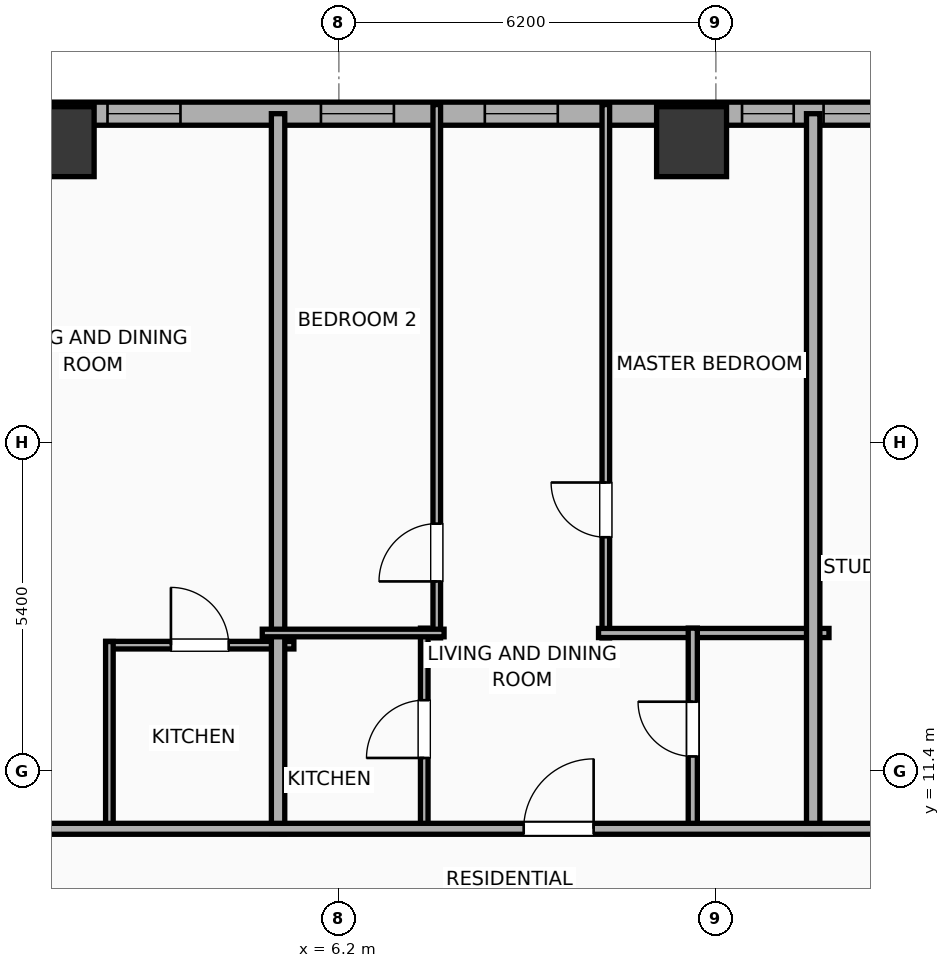
"""IFC4 building model, lengths in metres.
Left out: names, types, materials, properties, quantities, classifications, styles, units other than length and angle.
Written with IfcOpenShell. Run it as: python <this file> out.ifc"""

import sys

from ifc_helpers import new_model, si_unit, direction, frame, frame_2d, origin, origin_2d, place, context, subcontext, project, spatial, rectangle, hollow_rectangle, extrude, element, fill, save


model = new_model("IFC4")
c1 = context("Model", 3, precision=1e-05, world=origin(), true_north=direction((0.0, 1.0)))
c2 = subcontext(c1, "Body", "Model", "MODEL_VIEW")
j1 = project(units=[si_unit("LENGTHUNIT", "METRE"), si_unit("PLANEANGLEUNIT", "RADIAN")], contexts=[c1])
p1 = place(None, origin())
s1 = spatial("IfcSite", under=j1, at=p1, CompositionType="ELEMENT")
p2 = place(p1, origin())
s2 = spatial("IfcBuilding", under=s1, at=p2, CompositionType="ELEMENT")
p3 = place(p2, frame((0.0, 0.0, 72.8)))
s3 = spatial("IfcBuildingStorey", under=s2, at=p3, CompositionType="ELEMENT", Elevation=72.8)
for number, where, z_axis, x_axis in (
    (1, (12.0, 21.75, 0.0), (0.0, 0.0, 1.0), (1.0, 0.0, 0.0)),
    (2, (1.6, 21.75, 0.0), (0.0, 0.0, 1.0), (1.0, 0.0, 0.0)),
):
    element("IfcColumn", number, at=place(p3, frame(where, z_axis=z_axis, x_axis=x_axis)), inside=s3, PredefinedType="COLUMN", context=c2, shape_type="SweptSolid", body=[
        extrude(hollow_rectangle(XDim=1.15, YDim=1.15, WallThickness=0.04, at=origin_2d()), origin(), (0.0, 0.0, 1.0), 3.9),
    ])
p4 = place(p3, frame((-29.581, 22.21, 0.0), z_axis=(0.0, 0.0, 1.0), x_axis=(1.0, 0.0, 0.0)))
e3 = element("IfcWall", 3, at=p4, inside=s3, PredefinedType="ELEMENTEDWALL", context=c2, shape_type="SweptSolid", body=[
    extrude(rectangle(XDim=51.963, YDim=0.38, at=frame_2d((25.981, 0.0))), origin(), (0.0, 0.0, 1.0), 3.65),
])
p5 = place(p4, frame((5.81, 0.0, 0.75)))
e4 = element("IfcOpeningElement", 4, at=p5, cuts=e3, PredefinedType="OPENING", context=c2, shape_type="SweptSolid", body=[
    extrude(rectangle(XDim=2.4, YDim=2.1, at=frame_2d((1.2, 1.05))), frame((0.0, 0.2, 0.0), z_axis=(0.0, -1.0, 0.0), x_axis=(1.0, 0.0, 0.0)), (0.0, 0.0, 1.0), 0.4),
])
p6 = place(p4, frame((23.131, 0.0, 0.75)))
e5 = element("IfcOpeningElement", 5, at=p6, cuts=e3, PredefinedType="OPENING", context=c2, shape_type="SweptSolid", body=[
    extrude(rectangle(XDim=2.4, YDim=2.1, at=frame_2d((1.2, 1.05))), frame((0.0, 0.2, 0.0), z_axis=(0.0, -1.0, 0.0), x_axis=(1.0, 0.0, 0.0)), (0.0, 0.0, 1.0), 0.4),
])
p7 = place(p4, frame((43.752, 0.0, 0.75)))
e6 = element("IfcOpeningElement", 6, at=p7, cuts=e3, PredefinedType="OPENING", context=c2, shape_type="SweptSolid", body=[
    extrude(rectangle(XDim=2.4, YDim=2.1, at=frame_2d((1.2, 1.05))), frame((0.0, 0.2, 0.0), z_axis=(0.0, -1.0, 0.0), x_axis=(1.0, 0.0, 0.0)), (0.0, 0.0, 1.0), 0.4),
])
p8 = place(p4, frame((2.819, 0.0, 0.75)))
e7 = element("IfcOpeningElement", 7, at=p8, cuts=e3, PredefinedType="OPENING", context=c2, shape_type="SweptSolid", body=[
    extrude(rectangle(XDim=1.2, YDim=2.05, at=frame_2d((0.6, 1.025))), frame((0.0, 0.2, 0.0), z_axis=(0.0, -1.0, 0.0), x_axis=(1.0, 0.0, 0.0)), (0.0, 0.0, 1.0), 0.4),
])
p9 = place(p4, frame((11.781, 0.0, 0.75)))
e8 = element("IfcOpeningElement", 8, at=p9, cuts=e3, PredefinedType="OPENING", context=c2, shape_type="SweptSolid", body=[
    extrude(rectangle(XDim=1.2, YDim=2.05, at=frame_2d((0.6, 1.025))), frame((0.0, 0.2, 0.0), z_axis=(0.0, -1.0, 0.0), x_axis=(1.0, 0.0, 0.0)), (0.0, 0.0, 1.0), 0.4),
])
p10 = place(p4, frame((8.781, 0.0, 0.75)))
e9 = element("IfcOpeningElement", 9, at=p10, cuts=e3, PredefinedType="OPENING", context=c2, shape_type="SweptSolid", body=[
    extrude(rectangle(XDim=0.85, YDim=2.05, at=frame_2d((0.425, 1.025))), frame((0.0, 0.2, 0.0), z_axis=(0.0, -1.0, 0.0), x_axis=(1.0, 0.0, 0.0)), (0.0, 0.0, 1.0), 0.4),
])
p11 = place(p4, frame((14.876, 0.0, 0.75)))
e10 = element("IfcOpeningElement", 10, at=p11, cuts=e3, PredefinedType="OPENING", context=c2, shape_type="SweptSolid", body=[
    extrude(rectangle(XDim=1.2, YDim=2.05, at=frame_2d((0.6, 1.025))), frame((0.0, 0.2, 0.0), z_axis=(0.0, -1.0, 0.0), x_axis=(1.0, 0.0, 0.0)), (0.0, 0.0, 1.0), 0.4),
])
p12 = place(p4, frame((21.521, 0.0, 0.75)))
e11 = element("IfcOpeningElement", 11, at=p12, cuts=e3, PredefinedType="OPENING", context=c2, shape_type="SweptSolid", body=[
    extrude(rectangle(XDim=0.52, YDim=2.05, at=frame_2d((0.26, 1.025))), frame((0.0, 0.2, 0.0), z_axis=(0.0, -1.0, 0.0), x_axis=(1.0, 0.0, 0.0)), (0.0, 0.0, 1.0), 0.4),
])
p13 = place(p4, frame((17.886, 0.0, 0.75)))
e12 = element("IfcOpeningElement", 12, at=p13, cuts=e3, PredefinedType="OPENING", context=c2, shape_type="SweptSolid", body=[
    extrude(rectangle(XDim=1.2, YDim=2.05, at=frame_2d((0.6, 1.025))), frame((0.0, 0.2, 0.0), z_axis=(0.0, -1.0, 0.0), x_axis=(1.0, 0.0, 0.0)), (0.0, 0.0, 1.0), 0.4),
])
p14 = place(p4, frame((26.736, 0.0, 0.75)))
e13 = element("IfcOpeningElement", 13, at=p14, cuts=e3, PredefinedType="OPENING", context=c2, shape_type="SweptSolid", body=[
    extrude(rectangle(XDim=1.2, YDim=2.05, at=frame_2d((0.6, 1.025))), frame((0.0, 0.2, 0.0), z_axis=(0.0, -1.0, 0.0), x_axis=(1.0, 0.0, 0.0)), (0.0, 0.0, 1.0), 0.4),
])
p15 = place(p4, frame((31.976, 0.0, 0.75)))
e14 = element("IfcOpeningElement", 14, at=p15, cuts=e3, PredefinedType="OPENING", context=c2, shape_type="SweptSolid", body=[
    extrude(rectangle(XDim=1.2, YDim=2.05, at=frame_2d((0.6, 1.025))), frame((0.0, 0.2, 0.0), z_axis=(0.0, -1.0, 0.0), x_axis=(1.0, 0.0, 0.0)), (0.0, 0.0, 1.0), 0.4),
])
p16 = place(p4, frame((38.181, 0.0, 0.75)))
e15 = element("IfcOpeningElement", 15, at=p16, cuts=e3, PredefinedType="OPENING", context=c2, shape_type="SweptSolid", body=[
    extrude(rectangle(XDim=1.2, YDim=2.05, at=frame_2d((0.6, 1.025))), frame((0.0, 0.2, 0.0), z_axis=(0.0, -1.0, 0.0), x_axis=(1.0, 0.0, 0.0)), (0.0, 0.0, 1.0), 0.4),
])
p17 = place(p4, frame((35.486, 0.0, 0.75)))
e16 = element("IfcOpeningElement", 16, at=p17, cuts=e3, PredefinedType="OPENING", context=c2, shape_type="SweptSolid", body=[
    extrude(rectangle(XDim=1.2, YDim=2.05, at=frame_2d((0.6, 1.025))), frame((0.0, 0.2, 0.0), z_axis=(0.0, -1.0, 0.0), x_axis=(1.0, 0.0, 0.0)), (0.0, 0.0, 1.0), 0.4),
])
p18 = place(p4, frame((42.411, 0.0, 0.75)))
e17 = element("IfcOpeningElement", 17, at=p18, cuts=e3, PredefinedType="OPENING", context=c2, shape_type="SweptSolid", body=[
    extrude(rectangle(XDim=0.85, YDim=2.05, at=frame_2d((0.425, 1.025))), frame((0.0, 0.2, 0.0), z_axis=(0.0, -1.0, 0.0), x_axis=(1.0, 0.0, 0.0)), (0.0, 0.0, 1.0), 0.4),
])
p19 = place(p4, frame((47.943, 0.0, 0.75)))
e18 = element("IfcOpeningElement", 18, at=p19, cuts=e3, PredefinedType="OPENING", context=c2, shape_type="SweptSolid", body=[
    extrude(rectangle(XDim=1.2, YDim=2.05, at=frame_2d((0.6, 1.025))), frame((0.0, 0.2, 0.0), z_axis=(0.0, -1.0, 0.0), x_axis=(1.0, 0.0, 0.0)), (0.0, 0.0, 1.0), 0.4),
])
p20 = place(p4, frame((49.901, 0.0, 0.75)))
e19 = element("IfcOpeningElement", 19, at=p20, cuts=e3, PredefinedType="OPENING", context=c2, shape_type="SweptSolid", body=[
    extrude(rectangle(XDim=1.2, YDim=2.05, at=frame_2d((0.6, 1.025))), frame((0.0, 0.2, 0.0), z_axis=(0.0, -1.0, 0.0), x_axis=(1.0, 0.0, 0.0)), (0.0, 0.0, 1.0), 0.4),
])
p21 = place(p3, frame((2.366, 13.47, 0.0), z_axis=(0.0, 0.0, 1.0), x_axis=(1.0, 0.0, 0.0)))
e20 = element("IfcWall", 20, at=p21, inside=s3, PredefinedType="PARTITIONING", context=c2, shape_type="SweptSolid", body=[
    extrude(rectangle(XDim=3.094, YDim=0.125, at=frame_2d((1.547, 0.0))), origin(), (0.0, 0.0, 1.0), 3.65),
])
p22 = place(p21, frame((1.072, 0.0, 0.0)))
e21 = element("IfcOpeningElement", 21, at=p22, cuts=e20, PredefinedType="OPENING", context=c2, shape_type="SweptSolid", body=[
    extrude(rectangle(XDim=0.95, YDim=2.05, at=frame_2d((0.475, 1.025))), frame((0.0, 0.073, 0.0), z_axis=(0.0, -1.0, 0.0), x_axis=(1.0, 0.0, 0.0)), (0.0, 0.0, 1.0), 0.145),
])
p23 = place(p3, frame((2.426, 10.43, 0.0), z_axis=(0.0, 0.0, 1.0), x_axis=(0.0, 1.0, 0.0)))
e22 = element("IfcWall", 22, at=p23, inside=s3, PredefinedType="PARTITIONING", context=c2, shape_type="SweptSolid", body=[
    extrude(rectangle(XDim=3.1, YDim=0.125, at=frame_2d((1.55, 0.0))), origin(), (0.0, 0.0, 1.0), 3.65),
])
p24 = place(p3, frame((5.2, 10.37, 0.0), z_axis=(0.0, 0.0, 1.0), x_axis=(0.0, 1.0, 0.0)))
e23 = element("IfcWall", 23, at=p24, inside=s3, PredefinedType="PARTITIONING", context=c2, shape_type="SweptSolid", body=[
    extrude(rectangle(XDim=11.84, YDim=0.22, at=frame_2d((5.92, 0.0))), origin(), (0.0, 0.0, 1.0), 3.65),
])
p25 = place(p3, frame((7.81, 13.59, 0.0), z_axis=(0.0, 0.0, 1.0), x_axis=(0.0, 1.0, 0.0)))
e24 = element("IfcWall", 24, at=p25, inside=s3, PredefinedType="PARTITIONING", context=c2, shape_type="SweptSolid", body=[
    extrude(rectangle(XDim=8.77, YDim=0.125, at=frame_2d((4.385, 0.0))), origin(), (0.0, 0.0, 1.0), 3.65),
])
p26 = place(p25, frame((0.928, 0.0, 0.0)))
e25 = element("IfcOpeningElement", 25, at=p26, cuts=e24, PredefinedType="OPENING", context=c2, shape_type="SweptSolid", body=[
    extrude(rectangle(XDim=0.95, YDim=2.05, at=frame_2d((0.475, 1.025))), frame((0.0, 0.073, 0.0), z_axis=(0.0, -1.0, 0.0), x_axis=(1.0, 0.0, 0.0)), (0.0, 0.0, 1.0), 0.145),
])
p27 = place(p3, frame((10.59, 13.59, 0.0), z_axis=(0.0, 0.0, 1.0), x_axis=(0.0, 1.0, 0.0)))
e26 = element("IfcWall", 26, at=p27, inside=s3, PredefinedType="PARTITIONING", context=c2, shape_type="SweptSolid", body=[
    extrude(rectangle(XDim=8.77, YDim=0.125, at=frame_2d((4.385, 0.0))), origin(), (0.0, 0.0, 1.0), 3.65),
])
p28 = place(p27, frame((1.655, 0.0, 0.0)))
e27 = element("IfcOpeningElement", 27, at=p28, cuts=e26, PredefinedType="OPENING", context=c2, shape_type="SweptSolid", body=[
    extrude(rectangle(XDim=0.9, YDim=2.05, at=frame_2d((0.45, 1.025))), frame((0.0, 0.073, 0.0), z_axis=(0.0, -1.0, 0.0), x_axis=(1.0, 0.0, 0.0)), (0.0, 0.0, 1.0), 0.145),
])
p29 = place(p3, frame((10.47, 13.67, 0.0), z_axis=(0.0, 0.0, 1.0), x_axis=(1.0, 0.0, 0.0)))
e28 = element("IfcWall", 28, at=p29, inside=s3, PredefinedType="PLUMBINGWALL", context=c2, shape_type="SweptSolid", body=[
    extrude(rectangle(XDim=3.79, YDim=0.15, at=frame_2d((1.895, 0.0))), origin(), (0.0, 0.0, 1.0), 3.65),
])
p30 = place(p3, frame((7.604, 10.43, 0.0), z_axis=(0.0, 0.0, 1.0), x_axis=(0.0, 1.0, 0.0)))
e29 = element("IfcWall", 29, at=p30, inside=s3, PredefinedType="PARTITIONING", context=c2, shape_type="SweptSolid", body=[
    extrude(rectangle(XDim=3.32, YDim=0.125, at=frame_2d((1.66, 0.0))), origin(), (0.0, 0.0, 1.0), 3.65),
])
p31 = place(p30, frame((1.185, 0.0, 0.0)))
e30 = element("IfcOpeningElement", 30, at=p31, cuts=e29, PredefinedType="OPENING", context=c2, shape_type="SweptSolid", body=[
    extrude(rectangle(XDim=0.95, YDim=2.05, at=frame_2d((0.475, 1.025))), frame((0.0, 0.073, 0.0), z_axis=(0.0, -1.0, 0.0), x_axis=(1.0, 0.0, 0.0)), (0.0, 0.0, 1.0), 0.145),
])
p32 = place(p3, frame((4.94, 13.67, 0.0), z_axis=(0.0, 0.0, 1.0), x_axis=(1.0, 0.0, 0.0)))
e31 = element("IfcWall", 31, at=p32, inside=s3, PredefinedType="PARTITIONING", context=c2, shape_type="SweptSolid", body=[
    extrude(rectangle(XDim=2.99, YDim=0.125, at=frame_2d((1.495, 0.0))), origin(), (0.0, 0.0, 1.0), 3.65),
])
p33 = place(p3, frame((12.02, 10.43, 0.0), z_axis=(0.0, 0.0, 1.0), x_axis=(0.0, 1.0, 0.0)))
e32 = element("IfcWall", 32, at=p33, inside=s3, PredefinedType="PLUMBINGWALL", context=c2, shape_type="SweptSolid", body=[
    extrude(rectangle(XDim=3.32, YDim=0.15, at=frame_2d((1.66, 0.0))), origin(), (0.0, 0.0, 1.0), 2.94),
])
p34 = place(p33, frame((1.21, 0.0, 0.0)))
e33 = element("IfcOpeningElement", 33, at=p34, cuts=e32, PredefinedType="OPENING", context=c2, shape_type="SweptSolid", body=[
    extrude(rectangle(XDim=0.9, YDim=2.05, at=frame_2d((0.45, 1.025))), frame((0.0, 0.085, 0.0), z_axis=(0.0, -1.0, 0.0), x_axis=(1.0, 0.0, 0.0)), (0.0, 0.0, 1.0), 0.17),
])
p35 = place(p3, frame((14.0, 10.37, 0.0), z_axis=(0.0, 0.0, 1.0), x_axis=(0.0, 1.0, 0.0)))
e34 = element("IfcWall", 34, at=p35, inside=s3, PredefinedType="PARTITIONING", context=c2, shape_type="SweptSolid", body=[
    extrude(rectangle(XDim=11.84, YDim=0.22, at=frame_2d((5.92, 0.0))), origin(), (0.0, 0.0, 1.0), 3.65),
])
p36 = place(p3, frame((-33.41, 10.45, 0.0), z_axis=(0.0, 0.0, 1.0), x_axis=(1.0, 0.0, 0.0)))
e35 = element("IfcWall", 35, at=p36, inside=s3, PredefinedType="PARTITIONING", context=c2, shape_type="SweptSolid", body=[
    extrude(rectangle(XDim=59.62, YDim=0.18, at=frame_2d((29.81, 0.0))), origin(), (0.0, 0.0, 1.0), 3.65),
])
p37 = place(p36, frame((2.686, 0.0, 0.0)))
e36 = element("IfcOpeningElement", 36, at=p37, cuts=e35, PredefinedType="OPENING", context=c2, shape_type="SweptSolid", body=[
    extrude(rectangle(XDim=0.9, YDim=2.05, at=frame_2d((0.45, 1.025))), frame((0.0, 0.1, 0.0), z_axis=(0.0, -1.0, 0.0), x_axis=(1.0, 0.0, 0.0)), (0.0, 0.0, 1.0), 0.2),
])
p38 = place(p36, frame((9.698, 0.0, 0.0)))
e37 = element("IfcOpeningElement", 37, at=p38, cuts=e35, PredefinedType="OPENING", context=c2, shape_type="SweptSolid", body=[
    extrude(rectangle(XDim=1.15, YDim=2.05, at=frame_2d((0.575, 1.025))), frame((0.0, 0.1, 0.0), z_axis=(0.0, -1.0, 0.0), x_axis=(1.0, 0.0, 0.0)), (0.0, 0.0, 1.0), 0.2),
])
p39 = place(p36, frame((16.22, 0.0, 0.0)))
e38 = element("IfcOpeningElement", 38, at=p39, cuts=e35, PredefinedType="OPENING", context=c2, shape_type="SweptSolid", body=[
    extrude(rectangle(XDim=1.15, YDim=2.05, at=frame_2d((0.575, 1.025))), frame((0.0, 0.1, 0.0), z_axis=(0.0, -1.0, 0.0), x_axis=(1.0, 0.0, 0.0)), (0.0, 0.0, 1.0), 0.2),
])
p40 = place(p36, frame((25.073, 0.0, 0.0)))
e39 = element("IfcOpeningElement", 39, at=p40, cuts=e35, PredefinedType="OPENING", context=c2, shape_type="SweptSolid", body=[
    extrude(rectangle(XDim=1.15, YDim=2.05, at=frame_2d((0.575, 1.025))), frame((0.0, 0.1, 0.0), z_axis=(0.0, -1.0, 0.0), x_axis=(1.0, 0.0, 0.0)), (0.0, 0.0, 1.0), 0.2),
])
p41 = place(p36, frame((33.605, 0.0, 0.0)))
e40 = element("IfcOpeningElement", 40, at=p41, cuts=e35, PredefinedType="OPENING", context=c2, shape_type="SweptSolid", body=[
    extrude(rectangle(XDim=1.15, YDim=2.05, at=frame_2d((0.575, 1.025))), frame((0.0, 0.1, 0.0), z_axis=(0.0, -1.0, 0.0), x_axis=(1.0, 0.0, 0.0)), (0.0, 0.0, 1.0), 0.2),
])
p42 = place(p36, frame((42.649, 0.0, 0.0)))
e41 = element("IfcOpeningElement", 41, at=p42, cuts=e35, PredefinedType="OPENING", context=c2, shape_type="SweptSolid", body=[
    extrude(rectangle(XDim=1.15, YDim=2.05, at=frame_2d((0.575, 1.025))), frame((0.0, 0.1, 0.0), z_axis=(0.0, -1.0, 0.0), x_axis=(1.0, 0.0, 0.0)), (0.0, 0.0, 1.0), 0.2),
])
p43 = place(p36, frame((48.772, 0.0, 0.0)))
e42 = element("IfcOpeningElement", 42, at=p43, cuts=e35, PredefinedType="OPENING", context=c2, shape_type="SweptSolid", body=[
    extrude(rectangle(XDim=1.15, YDim=2.05, at=frame_2d((0.575, 1.025))), frame((0.0, 0.1, 0.0), z_axis=(0.0, -1.0, 0.0), x_axis=(1.0, 0.0, 0.0)), (0.0, 0.0, 1.0), 0.2),
])
p44 = place(p36, frame((56.272, 0.0, 0.0)))
e43 = element("IfcOpeningElement", 43, at=p44, cuts=e35, PredefinedType="OPENING", context=c2, shape_type="SweptSolid", body=[
    extrude(rectangle(XDim=0.9, YDim=2.05, at=frame_2d((0.45, 1.025))), frame((0.0, 0.1, 0.0), z_axis=(0.0, -1.0, 0.0), x_axis=(1.0, 0.0, 0.0)), (0.0, 0.0, 1.0), 0.2),
])
p45 = place(p7, origin())
e44 = element("IfcWindow", 44, at=p45, inside=s3, PartitioningType="SINGLE_PANEL", PredefinedType="WINDOW", context=c2, shape_type="SweptSolid", body=[
    extrude(rectangle(XDim=2.4, YDim=2.1, at=frame_2d((1.2, 1.05))), frame((0.0, 0.03, 0.0), z_axis=(0.0, -1.0, 0.0), x_axis=(1.0, 0.0, 0.0)), (0.0, 0.0, 1.0), 0.06),
])
fill(e6, e44)
p46 = place(p15, origin())
e45 = element("IfcWindow", 45, at=p46, inside=s3, PartitioningType="SINGLE_PANEL", PredefinedType="WINDOW", context=c2, shape_type="SweptSolid", body=[
    extrude(rectangle(XDim=1.2, YDim=2.05, at=frame_2d((0.6, 1.025))), frame((0.0, 0.03, 0.0), z_axis=(0.0, -1.0, 0.0), x_axis=(1.0, 0.0, 0.0)), (0.0, 0.0, 1.0), 0.06),
])
fill(e14, e45)
p47 = place(p16, origin())
e46 = element("IfcWindow", 46, at=p47, inside=s3, PartitioningType="SINGLE_PANEL", PredefinedType="WINDOW", context=c2, shape_type="SweptSolid", body=[
    extrude(rectangle(XDim=1.2, YDim=2.05, at=frame_2d((0.6, 1.025))), frame((0.0, 0.03, 0.0), z_axis=(0.0, -1.0, 0.0), x_axis=(1.0, 0.0, 0.0)), (0.0, 0.0, 1.0), 0.06),
])
fill(e15, e46)
p48 = place(p17, origin())
e47 = element("IfcWindow", 47, at=p48, inside=s3, PartitioningType="SINGLE_PANEL", PredefinedType="WINDOW", context=c2, shape_type="SweptSolid", body=[
    extrude(rectangle(XDim=1.2, YDim=2.05, at=frame_2d((0.6, 1.025))), frame((0.0, 0.03, 0.0), z_axis=(0.0, -1.0, 0.0), x_axis=(1.0, 0.0, 0.0)), (0.0, 0.0, 1.0), 0.06),
])
fill(e16, e47)
p49 = place(p18, origin())
e48 = element("IfcWindow", 48, at=p49, inside=s3, PartitioningType="SINGLE_PANEL", PredefinedType="WINDOW", context=c2, shape_type="SweptSolid", body=[
    extrude(rectangle(XDim=0.85, YDim=2.05, at=frame_2d((0.425, 1.025))), frame((0.0, 0.03, 0.0), z_axis=(0.0, -1.0, 0.0), x_axis=(1.0, 0.0, 0.0)), (0.0, 0.0, 1.0), 0.06),
])
fill(e17, e48)
p50 = place(p22, origin())
e49 = element("IfcDoor", 49, at=p50, inside=s3, OperationType="SINGLE_SWING_LEFT", PredefinedType="DOOR", context=c2, shape_type="SweptSolid", body=[
    extrude(rectangle(XDim=0.95, YDim=2.05, at=frame_2d((0.475, 1.025))), frame((0.0, 0.025, 0.0), z_axis=(0.0, -1.0, 0.0), x_axis=(1.0, 0.0, 0.0)), (0.0, 0.0, 1.0), 0.05),
])
fill(e21, e49)
p51 = place(p26, origin())
e50 = element("IfcDoor", 50, at=p51, inside=s3, OperationType="SINGLE_SWING_LEFT", PredefinedType="DOOR", context=c2, shape_type="SweptSolid", body=[
    extrude(rectangle(XDim=0.95, YDim=2.05, at=frame_2d((0.475, 1.025))), frame((0.0, 0.025, 0.0), z_axis=(0.0, -1.0, 0.0), x_axis=(1.0, 0.0, 0.0)), (0.0, 0.0, 1.0), 0.05),
])
fill(e25, e50)
p52 = place(p28, origin())
e51 = element("IfcDoor", 51, at=p52, inside=s3, OperationType="SINGLE_SWING_RIGHT", PredefinedType="DOOR", context=c2, shape_type="SweptSolid", body=[
    extrude(rectangle(XDim=0.9, YDim=2.05, at=frame_2d((0.45, 1.025))), frame((0.0, 0.025, 0.0), z_axis=(0.0, -1.0, 0.0), x_axis=(1.0, 0.0, 0.0)), (0.0, 0.0, 1.0), 0.05),
])
fill(e27, e51)
p53 = place(p31, origin())
e52 = element("IfcDoor", 52, at=p53, inside=s3, OperationType="SINGLE_SWING_LEFT", PredefinedType="DOOR", context=c2, shape_type="SweptSolid", body=[
    extrude(rectangle(XDim=0.95, YDim=2.05, at=frame_2d((0.475, 1.025))), frame((0.0, 0.025, 0.0), z_axis=(0.0, -1.0, 0.0), x_axis=(1.0, 0.0, 0.0)), (0.0, 0.0, 1.0), 0.05),
])
fill(e30, e52)
p54 = place(p34, origin())
e53 = element("IfcDoor", 53, at=p54, inside=s3, OperationType="SINGLE_SWING_RIGHT", PredefinedType="DOOR", context=c2, shape_type="SweptSolid", body=[
    extrude(rectangle(XDim=0.9, YDim=2.05, at=frame_2d((0.45, 1.025))), frame((0.0, 0.025, 0.0), z_axis=(0.0, -1.0, 0.0), x_axis=(1.0, 0.0, 0.0)), (0.0, 0.0, 1.0), 0.05),
])
fill(e33, e53)
p55 = place(p42, origin())
e54 = element("IfcDoor", 54, at=p55, inside=s3, OperationType="SINGLE_SWING_RIGHT", PredefinedType="DOOR", context=c2, shape_type="SweptSolid", body=[
    extrude(rectangle(XDim=1.15, YDim=2.05, at=frame_2d((0.575, 1.025))), frame((0.0, 0.025, 0.0), z_axis=(0.0, -1.0, 0.0), x_axis=(1.0, 0.0, 0.0)), (0.0, 0.0, 1.0), 0.05),
])
fill(e41, e54)
save(model, sys.argv[1])
